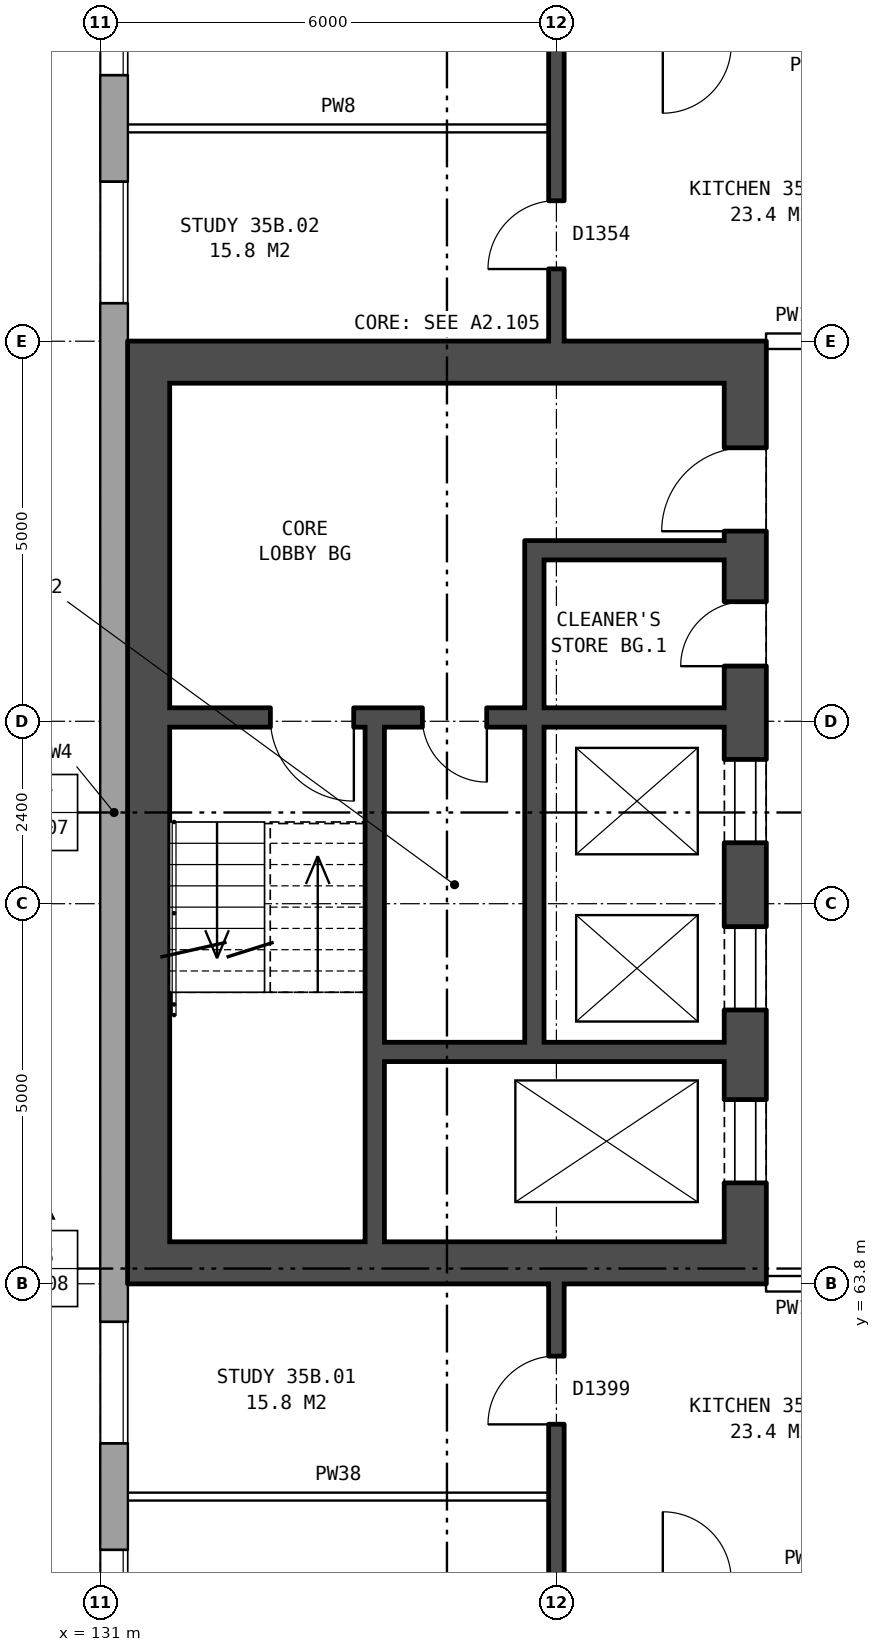
"""IFC4 building model, lengths in metres.
Left out: names, types, materials, properties, quantities, classifications, styles, units other than length and angle.
Written with IfcOpenShell. Run it as: python <this file> out.ifc"""

import sys

from ifc_helpers import new_model, si_unit, direction, frame, frame_2d, origin, place, context, subcontext, project, spatial, rectangle, extrude, element, fill, save


model = new_model("IFC4")
c1 = context("Model", 3, precision=1e-05, world=origin(), true_north=direction((0.0, 1.0)))
c2 = subcontext(c1, "Body", "Model", "MODEL_VIEW")
j1 = project(units=[si_unit("LENGTHUNIT", "METRE"), si_unit("PLANEANGLEUNIT", "RADIAN")], contexts=[c1])
p1 = place(None, origin())
s1 = spatial("IfcSite", under=j1, at=p1, CompositionType="ELEMENT")
p2 = place(p1, origin())
s2 = spatial("IfcBuilding", under=s1, at=p2, CompositionType="ELEMENT")
p3 = place(p2, frame((0.0, 0.0, 126.8)))
s3 = spatial("IfcBuildingStorey", under=s2, at=p3, CompositionType="ELEMENT", Elevation=126.8)
p4 = place(p3, frame((131.18, 82.925, 0.0), z_axis=(0.0, 0.0, 1.0), x_axis=(0.0, -1.0, 0.0)))
e1 = element("IfcWall", 1, at=p4, inside=s3, PredefinedType="STANDARD", context=c2, shape_type="SweptSolid", body=[
    extrude(rectangle(XDim=25.851, YDim=0.36, at=frame_2d((12.925, 0.0))), origin(), (0.0, 0.0, 1.0), 2.85),
])
p5 = place(p4, frame((1.625, 0.0, 0.8)))
e2 = element("IfcOpeningElement", 2, at=p5, cuts=e1, PredefinedType="OPENING", context=c2, shape_type="SweptSolid", body=[
    extrude(rectangle(XDim=1.6, YDim=1.8, at=frame_2d((0.8, 0.9))), frame((0.0, 0.19, 0.0), z_axis=(0.0, -1.0, 0.0), x_axis=(1.0, 0.0, 0.0)), (0.0, 0.0, 1.0), 0.38),
])
p6 = place(p4, frame((4.625, 0.0, 0.8)))
e3 = element("IfcOpeningElement", 3, at=p6, cuts=e1, PredefinedType="OPENING", context=c2, shape_type="SweptSolid", body=[
    extrude(rectangle(XDim=1.6, YDim=1.8, at=frame_2d((0.8, 0.9))), frame((0.0, 0.19, 0.0), z_axis=(0.0, -1.0, 0.0), x_axis=(1.0, 0.0, 0.0)), (0.0, 0.0, 1.0), 0.38),
])
p7 = place(p4, frame((19.625, 0.0, 0.8)))
e4 = element("IfcOpeningElement", 4, at=p7, cuts=e1, PredefinedType="OPENING", context=c2, shape_type="SweptSolid", body=[
    extrude(rectangle(XDim=1.6, YDim=1.8, at=frame_2d((0.8, 0.9))), frame((0.0, 0.19, 0.0), z_axis=(0.0, -1.0, 0.0), x_axis=(1.0, 0.0, 0.0)), (0.0, 0.0, 1.0), 0.38),
])
p8 = place(p4, frame((22.625, 0.0, 0.8)))
e5 = element("IfcOpeningElement", 5, at=p8, cuts=e1, PredefinedType="OPENING", context=c2, shape_type="SweptSolid", body=[
    extrude(rectangle(XDim=1.6, YDim=1.8, at=frame_2d((0.8, 0.9))), frame((0.0, 0.19, 0.0), z_axis=(0.0, -1.0, 0.0), x_axis=(1.0, 0.0, 0.0)), (0.0, 0.0, 1.0), 0.38),
])
p9 = place(p3, frame((139.485, 63.8, 0.0), z_axis=(0.0, 0.0, 1.0), x_axis=(0.0, 1.0, 0.0)))
e6 = element("IfcWall", 6, at=p9, inside=s3, PredefinedType="SHEAR", context=c2, shape_type="SweptSolid", body=[
    extrude(rectangle(XDim=12.4, YDim=0.55, at=frame_2d((6.2, 0.0))), origin(), (0.0, 0.0, 1.0), 2.85),
])
p10 = place(p9, frame((1.325, 0.0, 0.0)))
e7 = element("IfcOpeningElement", 7, at=p10, cuts=e6, PredefinedType="OPENING", context=c2, shape_type="SweptSolid", body=[
    extrude(rectangle(XDim=1.1, YDim=2.1, at=frame_2d((0.55, 1.05))), frame((0.0, 0.285, 0.0), z_axis=(0.0, -1.0, 0.0), x_axis=(1.0, 0.0, 0.0)), (0.0, 0.0, 1.0), 0.57),
])
p11 = place(p9, frame((3.6, 0.0, 0.0)))
e8 = element("IfcOpeningElement", 8, at=p11, cuts=e6, PredefinedType="OPENING", context=c2, shape_type="SweptSolid", body=[
    extrude(rectangle(XDim=1.1, YDim=2.1, at=frame_2d((0.55, 1.05))), frame((0.0, 0.285, 0.0), z_axis=(0.0, -1.0, 0.0), x_axis=(1.0, 0.0, 0.0)), (0.0, 0.0, 1.0), 0.57),
])
p12 = place(p9, frame((5.8, 0.0, 0.0)))
e9 = element("IfcOpeningElement", 9, at=p12, cuts=e6, PredefinedType="OPENING", context=c2, shape_type="SweptSolid", body=[
    extrude(rectangle(XDim=1.1, YDim=2.1, at=frame_2d((0.55, 1.05))), frame((0.0, 0.285, 0.0), z_axis=(0.0, -1.0, 0.0), x_axis=(1.0, 0.0, 0.0)), (0.0, 0.0, 1.0), 0.57),
])
p13 = place(p9, frame((9.9, 0.0, 0.0)))
e10 = element("IfcOpeningElement", 10, at=p13, cuts=e6, PredefinedType="OPENING", context=c2, shape_type="SweptSolid", body=[
    extrude(rectangle(XDim=1.1, YDim=2.1, at=frame_2d((0.55, 1.05))), frame((0.0, 0.285, 0.0), z_axis=(0.0, -1.0, 0.0), x_axis=(1.0, 0.0, 0.0)), (0.0, 0.0, 1.0), 0.57),
])
p14 = place(p9, frame((8.125, 0.0, 0.0)))
e11 = element("IfcOpeningElement", 11, at=p14, cuts=e6, PredefinedType="OPENING", context=c2, shape_type="SweptSolid", body=[
    extrude(rectangle(XDim=0.85, YDim=2.1, at=frame_2d((0.425, 1.05))), frame((0.0, 0.285, 0.0), z_axis=(0.0, -1.0, 0.0), x_axis=(1.0, 0.0, 0.0)), (0.0, 0.0, 1.0), 0.57),
])
p15 = place(p3, frame((131.635, 63.8, 0.0), z_axis=(0.0, 0.0, 1.0), x_axis=(0.0, 1.0, 0.0)))
e12 = element("IfcWall", 12, at=p15, inside=s3, PredefinedType="SHEAR", context=c2, shape_type="SweptSolid", body=[
    extrude(rectangle(XDim=12.4, YDim=0.55, at=frame_2d((6.2, 0.0))), origin(), (0.0, 0.0, 1.0), 2.85),
])
for number, where, z_axis, x_axis in (
    (13, (139.21, 64.075, 0.0), (0.0, 0.0, 1.0), (-1.0, 0.0, 0.0)),
    (14, (139.21, 75.925, 0.0), (0.0, 0.0, 1.0), (-1.0, 0.0, 0.0)),
):
    element("IfcWall", number, at=place(p3, frame(where, z_axis=z_axis, x_axis=x_axis)), inside=s3, PredefinedType="SHEAR", context=c2, shape_type="SweptSolid", body=[
        extrude(rectangle(XDim=7.3, YDim=0.55, at=frame_2d((3.65, 0.0))), origin(), (0.0, 0.0, 1.0), 2.85),
    ])
p16 = place(p3, frame((139.21, 66.85, 0.0), z_axis=(0.0, 0.0, 1.0), x_axis=(-1.0, 0.0, 0.0)))
e15 = element("IfcWall", 15, at=p16, inside=s3, PredefinedType="SHEAR", context=c2, shape_type="SweptSolid", body=[
    extrude(rectangle(XDim=4.475, YDim=0.25, at=frame_2d((2.237, 0.0))), origin(), (0.0, 0.0, 1.0), 2.85),
])
p17 = place(p3, frame((139.21, 71.25, 0.0), z_axis=(0.0, 0.0, 1.0), x_axis=(-1.0, 0.0, 0.0)))
e16 = element("IfcWall", 16, at=p17, inside=s3, PredefinedType="SHEAR", context=c2, shape_type="SweptSolid", body=[
    extrude(rectangle(XDim=7.3, YDim=0.25, at=frame_2d((3.65, 0.0))), origin(), (0.0, 0.0, 1.0), 2.85),
])
p18 = place(p17, frame((4.875, 0.0, 0.0)))
e17 = element("IfcOpeningElement", 17, at=p18, cuts=e16, PredefinedType="OPENING", context=c2, shape_type="SweptSolid", body=[
    extrude(rectangle(XDim=1.1, YDim=2.1, at=frame_2d((0.55, 1.05))), frame((0.0, 0.135, 0.0), z_axis=(0.0, -1.0, 0.0), x_axis=(1.0, 0.0, 0.0)), (0.0, 0.0, 1.0), 0.27),
])
p19 = place(p17, frame((3.125, 0.0, 0.0)))
e18 = element("IfcOpeningElement", 18, at=p19, cuts=e16, PredefinedType="OPENING", context=c2, shape_type="SweptSolid", body=[
    extrude(rectangle(XDim=0.85, YDim=2.1, at=frame_2d((0.425, 1.05))), frame((0.0, 0.135, 0.0), z_axis=(0.0, -1.0, 0.0), x_axis=(1.0, 0.0, 0.0)), (0.0, 0.0, 1.0), 0.27),
])
p20 = place(p3, frame((139.21, 73.45, 0.0), z_axis=(0.0, 0.0, 1.0), x_axis=(-1.0, 0.0, 0.0)))
e19 = element("IfcWall", 19, at=p20, inside=s3, PredefinedType="SHEAR", context=c2, shape_type="SweptSolid", body=[
    extrude(rectangle(XDim=2.375, YDim=0.25, at=frame_2d((1.188, 0.0))), origin(), (0.0, 0.0, 1.0), 2.85),
])
p21 = place(p3, frame((136.71, 66.975, 0.0), z_axis=(0.0, 0.0, 1.0), x_axis=(0.0, 1.0, 0.0)))
e20 = element("IfcWall", 20, at=p21, inside=s3, PredefinedType="SHEAR", context=c2, shape_type="SweptSolid", body=[
    extrude(rectangle(XDim=4.15, YDim=0.25, at=frame_2d((2.075, 0.0))), origin(), (0.0, 0.0, 1.0), 2.85),
])
p22 = place(p3, frame((136.71, 71.375, 0.0), z_axis=(0.0, 0.0, 1.0), x_axis=(0.0, 1.0, 0.0)))
e21 = element("IfcWall", 21, at=p22, inside=s3, PredefinedType="SHEAR", context=c2, shape_type="SweptSolid", body=[
    extrude(rectangle(XDim=2.2, YDim=0.25, at=frame_2d((1.1, 0.0))), origin(), (0.0, 0.0, 1.0), 2.85),
])
p23 = place(p3, frame((134.61, 64.35, 0.0), z_axis=(0.0, 0.0, 1.0), x_axis=(0.0, 1.0, 0.0)))
e22 = element("IfcWall", 22, at=p23, inside=s3, PredefinedType="SHEAR", context=c2, shape_type="SweptSolid", body=[
    extrude(rectangle(XDim=6.775, YDim=0.25, at=frame_2d((3.387, 0.0))), origin(), (0.0, 0.0, 1.0), 2.85),
])
p24 = place(p3, frame((131.36, 61.0, 0.0), z_axis=(0.0, 0.0, 1.0), x_axis=(1.0, 0.0, 0.0)))
e23 = element("IfcWall", 23, at=p24, inside=s3, PredefinedType="PARTITIONING", context=c2, shape_type="SweptSolid", body=[
    extrude(rectangle(XDim=5.54, YDim=0.1, at=frame_2d((2.77, 0.0))), origin(), (0.0, 0.0, 1.0), 2.85),
])
p25 = place(p3, frame((139.76, 63.8, 0.0), z_axis=(0.0, 0.0, 1.0), x_axis=(1.0, 0.0, 0.0)))
e24 = element("IfcWall", 24, at=p25, inside=s3, PredefinedType="PARTITIONING", context=c2, shape_type="SweptSolid", body=[
    extrude(rectangle(XDim=3.0, YDim=0.2, at=frame_2d((1.5, 0.0))), origin(), (0.0, 0.0, 1.0), 2.85),
])
p26 = place(p25, frame((1.0, 0.0, 0.0)))
e25 = element("IfcOpeningElement", 25, at=p26, cuts=e24, PredefinedType="OPENING", context=c2, shape_type="SweptSolid", body=[
    extrude(rectangle(XDim=1.0, YDim=2.1, at=frame_2d((0.5, 1.05))), frame((0.0, 0.11, 0.0), z_axis=(0.0, -1.0, 0.0), x_axis=(1.0, 0.0, 0.0)), (0.0, 0.0, 1.0), 0.22),
])
p27 = place(p3, frame((139.76, 76.2, 0.0), z_axis=(0.0, 0.0, 1.0), x_axis=(1.0, 0.0, 0.0)))
e26 = element("IfcWall", 26, at=p27, inside=s3, PredefinedType="PARTITIONING", context=c2, shape_type="SweptSolid", body=[
    extrude(rectangle(XDim=3.0, YDim=0.2, at=frame_2d((1.5, 0.0))), origin(), (0.0, 0.0, 1.0), 2.85),
])
p28 = place(p27, frame((1.0, 0.0, 0.0)))
e27 = element("IfcOpeningElement", 27, at=p28, cuts=e26, PredefinedType="OPENING", context=c2, shape_type="SweptSolid", body=[
    extrude(rectangle(XDim=1.0, YDim=2.1, at=frame_2d((0.5, 1.05))), frame((0.0, 0.11, 0.0), z_axis=(0.0, -1.0, 0.0), x_axis=(1.0, 0.0, 0.0)), (0.0, 0.0, 1.0), 0.22),
])
p29 = place(p3, frame((131.36, 79.0, 0.0), z_axis=(0.0, 0.0, 1.0), x_axis=(1.0, 0.0, 0.0)))
e28 = element("IfcWall", 28, at=p29, inside=s3, PredefinedType="PARTITIONING", context=c2, shape_type="SweptSolid", body=[
    extrude(rectangle(XDim=5.54, YDim=0.1, at=frame_2d((2.77, 0.0))), origin(), (0.0, 0.0, 1.0), 2.85),
])
p30 = place(p3, frame((137.0, 54.36, 0.0), z_axis=(0.0, 0.0, 1.0), x_axis=(0.0, 1.0, 0.0)))
e29 = element("IfcWall", 29, at=p30, inside=s3, PredefinedType="SOLIDWALL", context=c2, shape_type="SweptSolid", body=[
    extrude(rectangle(XDim=9.44, YDim=0.2, at=frame_2d((4.72, 0.0))), origin(), (0.0, 0.0, 1.0), 2.85),
])
p31 = place(p30, frame((2.32, 0.0, 0.0)))
e30 = element("IfcOpeningElement", 30, at=p31, cuts=e29, PredefinedType="OPENING", context=c2, shape_type="SweptSolid", body=[
    extrude(rectangle(XDim=0.9, YDim=2.1, at=frame_2d((0.45, 1.05))), frame((0.0, 0.11, 0.0), z_axis=(0.0, -1.0, 0.0), x_axis=(1.0, 0.0, 0.0)), (0.0, 0.0, 1.0), 0.22),
])
p32 = place(p30, frame((7.59, 0.0, 0.0)))
e31 = element("IfcOpeningElement", 31, at=p32, cuts=e29, PredefinedType="OPENING", context=c2, shape_type="SweptSolid", body=[
    extrude(rectangle(XDim=0.9, YDim=2.1, at=frame_2d((0.45, 1.05))), frame((0.0, 0.11, 0.0), z_axis=(0.0, -1.0, 0.0), x_axis=(1.0, 0.0, 0.0)), (0.0, 0.0, 1.0), 0.22),
])
p33 = place(p3, frame((137.0, 76.2, 0.0), z_axis=(0.0, 0.0, 1.0), x_axis=(0.0, 1.0, 0.0)))
e32 = element("IfcWall", 32, at=p33, inside=s3, PredefinedType="SOLIDWALL", context=c2, shape_type="SweptSolid", body=[
    extrude(rectangle(XDim=9.44, YDim=0.2, at=frame_2d((4.72, 0.0))), origin(), (0.0, 0.0, 1.0), 2.85),
])
p34 = place(p33, frame((6.22, 0.0, 0.0)))
e33 = element("IfcOpeningElement", 33, at=p34, cuts=e32, PredefinedType="OPENING", context=c2, shape_type="SweptSolid", body=[
    extrude(rectangle(XDim=0.9, YDim=2.1, at=frame_2d((0.45, 1.05))), frame((0.0, 0.11, 0.0), z_axis=(0.0, -1.0, 0.0), x_axis=(1.0, 0.0, 0.0)), (0.0, 0.0, 1.0), 0.22),
])
p35 = place(p33, frame((0.95, 0.0, 0.0)))
e34 = element("IfcOpeningElement", 34, at=p35, cuts=e32, PredefinedType="OPENING", context=c2, shape_type="SweptSolid", body=[
    extrude(rectangle(XDim=0.9, YDim=2.1, at=frame_2d((0.45, 1.05))), frame((0.0, 0.11, 0.0), z_axis=(0.0, -1.0, 0.0), x_axis=(1.0, 0.0, 0.0)), (0.0, 0.0, 1.0), 0.22),
])
p36 = place(p5, origin())
e35 = element("IfcWindow", 35, at=p36, inside=s3, PartitioningType="SINGLE_PANEL", PredefinedType="WINDOW", context=c2, shape_type="SweptSolid", body=[
    extrude(rectangle(XDim=1.6, YDim=1.8, at=frame_2d((0.8, 0.9))), frame((0.0, 0.15, 0.0), z_axis=(0.0, -1.0, 0.0), x_axis=(1.0, 0.0, 0.0)), (0.0, 0.0, 1.0), 0.06),
])
fill(e2, e35)
p37 = place(p6, origin())
e36 = element("IfcWindow", 36, at=p37, inside=s3, PartitioningType="SINGLE_PANEL", PredefinedType="WINDOW", context=c2, shape_type="SweptSolid", body=[
    extrude(rectangle(XDim=1.6, YDim=1.8, at=frame_2d((0.8, 0.9))), frame((0.0, 0.15, 0.0), z_axis=(0.0, -1.0, 0.0), x_axis=(1.0, 0.0, 0.0)), (0.0, 0.0, 1.0), 0.06),
])
fill(e3, e36)
p38 = place(p7, origin())
e37 = element("IfcWindow", 37, at=p38, inside=s3, PartitioningType="SINGLE_PANEL", PredefinedType="WINDOW", context=c2, shape_type="SweptSolid", body=[
    extrude(rectangle(XDim=1.6, YDim=1.8, at=frame_2d((0.8, 0.9))), frame((0.0, 0.15, 0.0), z_axis=(0.0, -1.0, 0.0), x_axis=(1.0, 0.0, 0.0)), (0.0, 0.0, 1.0), 0.06),
])
fill(e4, e37)
p39 = place(p8, origin())
e38 = element("IfcWindow", 38, at=p39, inside=s3, PartitioningType="SINGLE_PANEL", PredefinedType="WINDOW", context=c2, shape_type="SweptSolid", body=[
    extrude(rectangle(XDim=1.6, YDim=1.8, at=frame_2d((0.8, 0.9))), frame((0.0, 0.15, 0.0), z_axis=(0.0, -1.0, 0.0), x_axis=(1.0, 0.0, 0.0)), (0.0, 0.0, 1.0), 0.06),
])
fill(e5, e38)
p40 = place(p10, origin())
e39 = element("IfcDoor", 39, at=p40, inside=s3, OperationType="DOUBLE_DOOR_SLIDING", PredefinedType="DOOR", context=c2, shape_type="SweptSolid", body=[
    extrude(rectangle(XDim=1.1, YDim=2.1, at=frame_2d((0.55, 1.05))), frame((0.0, 0.26, 0.0), z_axis=(0.0, -1.0, 0.0), x_axis=(1.0, 0.0, 0.0)), (0.0, 0.0, 1.0), 0.05),
])
fill(e7, e39)
p41 = place(p11, origin())
e40 = element("IfcDoor", 40, at=p41, inside=s3, OperationType="DOUBLE_DOOR_SLIDING", PredefinedType="DOOR", context=c2, shape_type="SweptSolid", body=[
    extrude(rectangle(XDim=1.1, YDim=2.1, at=frame_2d((0.55, 1.05))), frame((0.0, 0.26, 0.0), z_axis=(0.0, -1.0, 0.0), x_axis=(1.0, 0.0, 0.0)), (0.0, 0.0, 1.0), 0.05),
])
fill(e8, e40)
p42 = place(p12, origin())
e41 = element("IfcDoor", 41, at=p42, inside=s3, OperationType="DOUBLE_DOOR_SLIDING", PredefinedType="DOOR", context=c2, shape_type="SweptSolid", body=[
    extrude(rectangle(XDim=1.1, YDim=2.1, at=frame_2d((0.55, 1.05))), frame((0.0, 0.26, 0.0), z_axis=(0.0, -1.0, 0.0), x_axis=(1.0, 0.0, 0.0)), (0.0, 0.0, 1.0), 0.05),
])
fill(e9, e41)
p43 = place(p13, origin())
e42 = element("IfcDoor", 42, at=p43, inside=s3, OperationType="SINGLE_SWING_LEFT", PredefinedType="DOOR", context=c2, shape_type="SweptSolid", body=[
    extrude(rectangle(XDim=1.1, YDim=2.1, at=frame_2d((0.55, 1.05))), frame((0.0, 0.26, 0.0), z_axis=(0.0, -1.0, 0.0), x_axis=(1.0, 0.0, 0.0)), (0.0, 0.0, 1.0), 0.05),
])
fill(e10, e42)
p44 = place(p18, origin())
e43 = element("IfcDoor", 43, at=p44, inside=s3, OperationType="SINGLE_SWING_LEFT", PredefinedType="DOOR", context=c2, shape_type="SweptSolid", body=[
    extrude(rectangle(XDim=1.1, YDim=2.1, at=frame_2d((0.55, 1.05))), frame((0.0, 0.025, 0.0), z_axis=(0.0, -1.0, 0.0), x_axis=(1.0, 0.0, 0.0)), (0.0, 0.0, 1.0), 0.05),
])
fill(e17, e43)
p45 = place(p14, origin())
e44 = element("IfcDoor", 44, at=p45, inside=s3, OperationType="SINGLE_SWING_LEFT", PredefinedType="DOOR", context=c2, shape_type="SweptSolid", body=[
    extrude(rectangle(XDim=0.85, YDim=2.1, at=frame_2d((0.425, 1.05))), frame((0.0, 0.26, 0.0), z_axis=(0.0, -1.0, 0.0), x_axis=(1.0, 0.0, 0.0)), (0.0, 0.0, 1.0), 0.05),
])
fill(e11, e44)
p46 = place(p19, origin())
e45 = element("IfcDoor", 45, at=p46, inside=s3, OperationType="SINGLE_SWING_LEFT", PredefinedType="DOOR", context=c2, shape_type="SweptSolid", body=[
    extrude(rectangle(XDim=0.85, YDim=2.1, at=frame_2d((0.425, 1.05))), frame((0.0, 0.025, 0.0), z_axis=(0.0, -1.0, 0.0), x_axis=(1.0, 0.0, 0.0)), (0.0, 0.0, 1.0), 0.05),
])
fill(e18, e45)
p47 = place(p32, origin())
e46 = element("IfcDoor", 46, at=p47, inside=s3, OperationType="SINGLE_SWING_LEFT", PredefinedType="DOOR", context=c2, shape_type="SweptSolid", body=[
    extrude(rectangle(XDim=0.9, YDim=2.1, at=frame_2d((0.45, 1.05))), frame((0.0, 0.025, 0.0), z_axis=(0.0, -1.0, 0.0), x_axis=(1.0, 0.0, 0.0)), (0.0, 0.0, 1.0), 0.05),
])
fill(e31, e46)
p48 = place(p35, origin())
e47 = element("IfcDoor", 47, at=p48, inside=s3, OperationType="SINGLE_SWING_LEFT", PredefinedType="DOOR", context=c2, shape_type="SweptSolid", body=[
    extrude(rectangle(XDim=0.9, YDim=2.1, at=frame_2d((0.45, 1.05))), frame((0.0, 0.025, 0.0), z_axis=(0.0, -1.0, 0.0), x_axis=(1.0, 0.0, 0.0)), (0.0, 0.0, 1.0), 0.05),
])
fill(e34, e47)
save(model, sys.argv[1])
